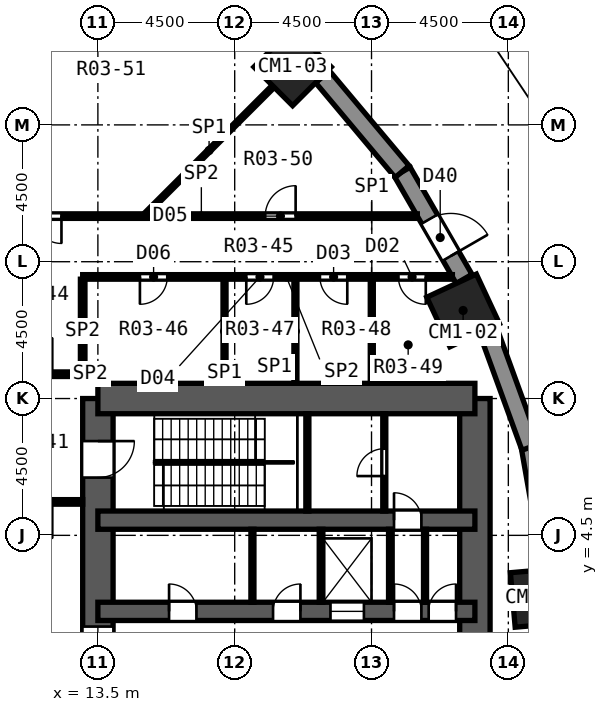
"""IFC4 building model, lengths in metres.
Left out: names, types, materials, properties, quantities, classifications, styles, units other than length and angle.
Written with IfcOpenShell. Run it as: python <this file> out.ifc"""

import sys

from ifc_helpers import new_model, si_unit, direction, frame, frame_2d, origin, origin_2d, place, context, subcontext, project, spatial, rectangle, extrude, element, fill, save


model = new_model("IFC4")
c1 = context("Model", 3, precision=1e-05, world=origin(), true_north=direction((0.0, 1.0)))
c2 = subcontext(c1, "Body", "Model", "MODEL_VIEW")
j1 = project(units=[si_unit("LENGTHUNIT", "METRE"), si_unit("PLANEANGLEUNIT", "RADIAN")], contexts=[c1])
p1 = place(None, origin())
s1 = spatial("IfcSite", under=j1, at=p1, CompositionType="ELEMENT")
p2 = place(p1, origin())
s2 = spatial("IfcBuilding", under=s1, at=p2, CompositionType="ELEMENT")
p3 = place(p2, origin())
s3 = spatial("IfcBuildingStorey", under=s2, at=p3, CompositionType="ELEMENT", Elevation=0.0)
for number, where, z_axis, x_axis in (
    (1, (28.043, 2.453, 0.0), (0.0, 0.0, 1.0), (0.996, 0.087, 0.0)),
    (2, (25.512, 11.897, 0.0), (0.0, 0.0, 1.0), (0.906, 0.423, 0.0)),
    (3, (19.905, 19.905, 0.0), (0.0, 0.0, 1.0), (0.707, 0.707, 0.0)),
):
    element("IfcColumn", number, at=place(p3, frame(where, z_axis=z_axis, x_axis=x_axis)), inside=s3, PredefinedType="COLUMN", context=c2, shape_type="SweptSolid", body=[
        extrude(rectangle(XDim=1.8, YDim=1.8, at=origin_2d()), origin(), (0.0, 0.0, 1.0), 5.0),
    ])
p4 = place(p3, frame((13.5, -9.0, 0.0), z_axis=(0.0, 0.0, 1.0), x_axis=(0.0, 1.0, 0.0)))
e4 = element("IfcWall", 4, at=p4, inside=s3, PredefinedType="SHEAR", context=c2, shape_type="SweptSolid", body=[
    extrude(rectangle(XDim=18.0, YDim=1.0, at=frame_2d((9.0, 0.0))), origin(), (0.0, 0.0, 1.0), 5.0),
])
p5 = place(p4, frame((15.4, 0.0, 0.0)))
e5 = element("IfcOpeningElement", 5, at=p5, cuts=e4, PredefinedType="OPENING", context=c2, shape_type="SweptSolid", body=[
    extrude(rectangle(XDim=1.2, YDim=2.1, at=frame_2d((0.6, 1.05))), frame((0.0, 0.512, 0.0), z_axis=(0.0, -1.0, 0.0), x_axis=(1.0, 0.0, 0.0)), (0.0, 0.0, 1.0), 1.024),
])
p6 = place(p4, frame((1.4, 0.0, 0.0)))
e6 = element("IfcOpeningElement", 6, at=p6, cuts=e4, PredefinedType="OPENING", context=c2, shape_type="SweptSolid", body=[
    extrude(rectangle(XDim=1.2, YDim=2.1, at=frame_2d((0.6, 1.05))), frame((0.0, 0.512, 0.0), z_axis=(0.0, -1.0, 0.0), x_axis=(1.0, 0.0, 0.0)), (0.0, 0.0, 1.0), 1.024),
])
p7 = place(p4, frame((7.5, 0.0, 0.0)))
e7 = element("IfcOpeningElement", 7, at=p7, cuts=e4, PredefinedType="OPENING", context=c2, shape_type="SweptSolid", body=[
    extrude(rectangle(XDim=3.0, YDim=2.4, at=frame_2d((1.5, 1.2))), frame((0.0, 0.512, 0.0), z_axis=(0.0, -1.0, 0.0), x_axis=(1.0, 0.0, 0.0)), (0.0, 0.0, 1.0), 1.024),
])
p8 = place(p3, frame((25.9, -9.0, 0.0), z_axis=(0.0, 0.0, 1.0), x_axis=(0.0, 1.0, 0.0)))
e8 = element("IfcWall", 8, at=p8, inside=s3, PredefinedType="SHEAR", context=c2, shape_type="SweptSolid", body=[
    extrude(rectangle(XDim=18.0, YDim=1.0, at=frame_2d((9.0, 0.0))), origin(), (0.0, 0.0, 1.0), 5.0),
])
p9 = place(p3, frame((13.5, 9.0, 0.0), z_axis=(0.0, 0.0, 1.0), x_axis=(1.0, 0.0, 0.0)))
e9 = element("IfcWall", 9, at=p9, inside=s3, PredefinedType="SHEAR", context=c2, shape_type="SweptSolid", body=[
    extrude(rectangle(XDim=12.4, YDim=1.0, at=frame_2d((6.2, 0.0))), origin(), (0.0, 0.0, 1.0), 5.0),
])
p10 = place(p3, frame((13.5, 5.0, 0.0), z_axis=(0.0, 0.0, 1.0), x_axis=(1.0, 0.0, 0.0)))
e10 = element("IfcWall", 10, at=p10, inside=s3, PredefinedType="SHEAR", context=c2, shape_type="SweptSolid", body=[
    extrude(rectangle(XDim=12.4, YDim=0.6, at=frame_2d((6.2, 0.0))), origin(), (0.0, 0.0, 1.0), 5.0),
])
p11 = place(p10, frame((9.74, 0.0, 0.0)))
e11 = element("IfcOpeningElement", 11, at=p11, cuts=e10, PredefinedType="OPENING", context=c2, shape_type="SweptSolid", body=[
    extrude(rectangle(XDim=0.9, YDim=2.1, at=frame_2d((0.45, 1.05))), frame((0.0, 0.312, 0.0), z_axis=(0.0, -1.0, 0.0), x_axis=(1.0, 0.0, 0.0)), (0.0, 0.0, 1.0), 0.624),
])
p12 = place(p3, frame((13.5, 2.0, 0.0), z_axis=(0.0, 0.0, 1.0), x_axis=(1.0, 0.0, 0.0)))
e12 = element("IfcWall", 12, at=p12, inside=s3, PredefinedType="SHEAR", context=c2, shape_type="SweptSolid", body=[
    extrude(rectangle(XDim=12.4, YDim=0.6, at=frame_2d((6.2, 0.0))), origin(), (0.0, 0.0, 1.0), 5.0),
])
p13 = place(p12, frame((7.65, 0.0, 0.0)))
e13 = element("IfcOpeningElement", 13, at=p13, cuts=e12, PredefinedType="OPENING", context=c2, shape_type="SweptSolid", body=[
    extrude(rectangle(XDim=1.1, YDim=2.1, at=frame_2d((0.55, 1.05))), frame((0.0, 0.312, 0.0), z_axis=(0.0, -1.0, 0.0), x_axis=(1.0, 0.0, 0.0)), (0.0, 0.0, 1.0), 0.624),
])
p14 = place(p12, frame((2.341, 0.0, 0.0)))
e14 = element("IfcOpeningElement", 14, at=p14, cuts=e12, PredefinedType="OPENING", context=c2, shape_type="SweptSolid", body=[
    extrude(rectangle(XDim=0.9, YDim=2.1, at=frame_2d((0.45, 1.05))), frame((0.0, 0.312, 0.0), z_axis=(0.0, -1.0, 0.0), x_axis=(1.0, 0.0, 0.0)), (0.0, 0.0, 1.0), 0.624),
])
p15 = place(p12, frame((5.761, 0.0, 0.0)))
e15 = element("IfcOpeningElement", 15, at=p15, cuts=e12, PredefinedType="OPENING", context=c2, shape_type="SweptSolid", body=[
    extrude(rectangle(XDim=0.9, YDim=2.1, at=frame_2d((0.45, 1.05))), frame((0.0, 0.312, 0.0), z_axis=(0.0, -1.0, 0.0), x_axis=(1.0, 0.0, 0.0)), (0.0, 0.0, 1.0), 0.624),
])
p16 = place(p12, frame((9.74, 0.0, 0.0)))
e16 = element("IfcOpeningElement", 16, at=p16, cuts=e12, PredefinedType="OPENING", context=c2, shape_type="SweptSolid", body=[
    extrude(rectangle(XDim=0.9, YDim=2.1, at=frame_2d((0.45, 1.05))), frame((0.0, 0.312, 0.0), z_axis=(0.0, -1.0, 0.0), x_axis=(1.0, 0.0, 0.0)), (0.0, 0.0, 1.0), 0.624),
])
p17 = place(p12, frame((10.88, 0.0, 0.0)))
e17 = element("IfcOpeningElement", 17, at=p17, cuts=e12, PredefinedType="OPENING", context=c2, shape_type="SweptSolid", body=[
    extrude(rectangle(XDim=0.9, YDim=2.1, at=frame_2d((0.45, 1.05))), frame((0.0, 0.312, 0.0), z_axis=(0.0, -1.0, 0.0), x_axis=(1.0, 0.0, 0.0)), (0.0, 0.0, 1.0), 0.624),
])
p18 = place(p3, frame((28.428, 3.417, 0.0), z_axis=(0.0, 0.0, 1.0), x_axis=(-0.173673210505, 0.984803338719, 0.0)))
e18 = element("IfcWall", 18, at=p18, inside=s3, PredefinedType="SOLIDWALL", context=c2, shape_type="SweptSolid", body=[
    extrude(rectangle(XDim=4.099, YDim=0.6, at=frame_2d((2.05, 0.0))), origin(), (0.0, 0.0, 1.0), 4.45),
])
p19 = place(p3, frame((27.73, 7.403, 0.0), z_axis=(0.0, 0.0, 1.0), x_axis=(-0.342034744565, 0.939687306241, 0.0)))
e19 = element("IfcWall", 19, at=p19, inside=s3, PredefinedType="SOLIDWALL", context=c2, shape_type="SweptSolid", body=[
    extrude(rectangle(XDim=4.099, YDim=0.6, at=frame_2d((2.05, 0.0))), origin(), (0.0, 0.0, 1.0), 4.45),
])
p20 = place(p3, frame((25.545, 12.934, 0.0), z_axis=(0.0, 0.0, 1.0), x_axis=(-0.500023678693, 0.866011732453, 0.0)))
e20 = element("IfcWall", 20, at=p20, inside=s3, PredefinedType="SOLIDWALL", context=c2, shape_type="SweptSolid", body=[
    extrude(rectangle(XDim=4.069, YDim=0.6, at=frame_2d((2.035, 0.0))), origin(), (0.0, 0.0, 1.0), 4.45),
])
p21 = place(p20, frame((0.872, 0.0, 0.0)))
e21 = element("IfcOpeningElement", 21, at=p21, cuts=e20, PredefinedType="OPENING", context=c2, shape_type="SweptSolid", body=[
    extrude(rectangle(XDim=1.4, YDim=2.1, at=frame_2d((0.7, 1.05))), frame((0.0, 0.312, 0.0), z_axis=(0.0, -1.0, 0.0), x_axis=(1.0, 0.0, 0.0)), (0.0, 0.0, 1.0), 0.624),
])
p22 = place(p3, frame((23.506, 16.464, 0.0), z_axis=(0.0, 0.0, 1.0), x_axis=(-0.642800844336, 0.766033337734, 0.0)))
e22 = element("IfcWall", 22, at=p22, inside=s3, PredefinedType="SOLIDWALL", context=c2, shape_type="SweptSolid", body=[
    extrude(rectangle(XDim=4.069, YDim=0.6, at=frame_2d((2.035, 0.0))), origin(), (0.0, 0.0, 1.0), 4.45),
])
p23 = place(p3, frame((9.8, 5.6, 0.0), z_axis=(0.0, 0.0, 1.0), x_axis=(1.0, 0.0, 0.0)))
e23 = element("IfcWall", 23, at=p23, inside=s3, PredefinedType="PARTITIONING", context=c2, shape_type="SweptSolid", body=[
    extrude(rectangle(XDim=3.2, YDim=0.15, at=frame_2d((1.6, 0.0))), origin(), (0.0, 0.0, 1.0), 4.45),
])
p24 = place(p23, frame((1.0, 0.0, 0.0)))
e24 = element("IfcOpeningElement", 24, at=p24, cuts=e23, PredefinedType="OPENING", context=c2, shape_type="SweptSolid", body=[
    extrude(rectangle(XDim=1.2, YDim=2.1, at=frame_2d((0.6, 1.05))), frame((0.0, 0.087, 0.0), z_axis=(0.0, -1.0, 0.0), x_axis=(1.0, 0.0, 0.0)), (0.0, 0.0, 1.0), 0.174),
])
p25 = place(p3, frame((9.8, 9.8, 0.0), z_axis=(0.0, 0.0, 1.0), x_axis=(1.0, 0.0, 0.0)))
e25 = element("IfcWall", 25, at=p25, inside=s3, PredefinedType="PARTITIONING", context=c2, shape_type="SweptSolid", body=[
    extrude(rectangle(XDim=3.125, YDim=0.15, at=frame_2d((1.562, 0.0))), origin(), (0.0, 0.0, 1.0), 4.45),
])
p26 = place(p25, frame((1.0, 0.0, 0.0)))
e26 = element("IfcOpeningElement", 26, at=p26, cuts=e25, PredefinedType="OPENING", context=c2, shape_type="SweptSolid", body=[
    extrude(rectangle(XDim=1.2, YDim=2.1, at=frame_2d((0.6, 1.05))), frame((0.0, 0.087, 0.0), z_axis=(0.0, -1.0, 0.0), x_axis=(1.0, 0.0, 0.0)), (0.0, 0.0, 1.0), 0.174),
])
p27 = place(p3, frame((13.0, 13.0, 0.0), z_axis=(0.0, 0.0, 1.0), x_axis=(1.0, 0.0, 0.0)))
e27 = element("IfcWall", 27, at=p27, inside=s3, PredefinedType="PARTITIONING", context=c2, shape_type="SweptSolid", body=[
    extrude(rectangle(XDim=12.16, YDim=0.15, at=frame_2d((6.08, 0.0))), origin(), (0.0, 0.0, 1.0), 4.45),
])
p28 = place(p27, frame((10.385, 0.0, 0.0)))
e28 = element("IfcOpeningElement", 28, at=p28, cuts=e27, PredefinedType="OPENING", context=c2, shape_type="SweptSolid", body=[
    extrude(rectangle(XDim=0.9, YDim=2.1, at=frame_2d((0.45, 1.05))), frame((0.0, 0.087, 0.0), z_axis=(0.0, -1.0, 0.0), x_axis=(1.0, 0.0, 0.0)), (0.0, 0.0, 1.0), 0.174),
])
p29 = place(p27, frame((7.803, 0.0, 0.0)))
e29 = element("IfcOpeningElement", 29, at=p29, cuts=e27, PredefinedType="OPENING", context=c2, shape_type="SweptSolid", body=[
    extrude(rectangle(XDim=0.9, YDim=2.1, at=frame_2d((0.45, 1.05))), frame((0.0, 0.087, 0.0), z_axis=(0.0, -1.0, 0.0), x_axis=(1.0, 0.0, 0.0)), (0.0, 0.0, 1.0), 0.174),
])
p30 = place(p27, frame((5.381, 0.0, 0.0)))
e30 = element("IfcOpeningElement", 30, at=p30, cuts=e27, PredefinedType="OPENING", context=c2, shape_type="SweptSolid", body=[
    extrude(rectangle(XDim=0.9, YDim=2.1, at=frame_2d((0.45, 1.05))), frame((0.0, 0.087, 0.0), z_axis=(0.0, -1.0, 0.0), x_axis=(1.0, 0.0, 0.0)), (0.0, 0.0, 1.0), 0.174),
])
p31 = place(p27, frame((1.883, 0.0, 0.0)))
e31 = element("IfcOpeningElement", 31, at=p31, cuts=e27, PredefinedType="OPENING", context=c2, shape_type="SweptSolid", body=[
    extrude(rectangle(XDim=0.9, YDim=2.1, at=frame_2d((0.45, 1.05))), frame((0.0, 0.087, 0.0), z_axis=(0.0, -1.0, 0.0), x_axis=(1.0, 0.0, 0.0)), (0.0, 0.0, 1.0), 0.174),
])
p32 = place(p3, frame((9.8, 15.0, 0.0), z_axis=(0.0, 0.0, 1.0), x_axis=(1.0, 0.0, 0.0)))
e32 = element("IfcWall", 32, at=p32, inside=s3, PredefinedType="PARTITIONING", context=c2, shape_type="SweptSolid", body=[
    extrude(rectangle(XDim=14.206, YDim=0.15, at=frame_2d((7.103, 0.0))), origin(), (0.0, 0.0, 1.0), 4.45),
])
p33 = place(p32, frame((9.204, 0.0, 0.0)))
e33 = element("IfcOpeningElement", 33, at=p33, cuts=e32, PredefinedType="OPENING", context=c2, shape_type="SweptSolid", body=[
    extrude(rectangle(XDim=1.0, YDim=2.1, at=frame_2d((0.5, 1.05))), frame((0.0, 0.087, 0.0), z_axis=(0.0, -1.0, 0.0), x_axis=(1.0, 0.0, 0.0)), (0.0, 0.0, 1.0), 0.174),
])
p34 = place(p32, frame((0.702, 0.0, 0.0)))
e34 = element("IfcOpeningElement", 34, at=p34, cuts=e32, PredefinedType="OPENING", context=c2, shape_type="SweptSolid", body=[
    extrude(rectangle(XDim=1.8, YDim=2.1, at=frame_2d((0.9, 1.05))), frame((0.0, 0.087, 0.0), z_axis=(0.0, -1.0, 0.0), x_axis=(1.0, 0.0, 0.0)), (0.0, 0.0, 1.0), 0.174),
])
p35 = place(p3, frame((15.053, 15.053, 0.0), z_axis=(0.0, 0.0, 1.0), x_axis=(0.707106781187, 0.707106781187, 0.0)))
e35 = element("IfcWall", 35, at=p35, inside=s3, PredefinedType="PARTITIONING", context=c2, shape_type="SweptSolid", body=[
    extrude(rectangle(XDim=5.952, YDim=0.1, at=frame_2d((2.976, 0.0))), origin(), (0.0, 0.0, 1.0), 4.45),
])
for number, where, z_axis, x_axis in (
    (36, (22.509, 9.5, 0.0), (0.0, 0.0, 1.0), (0.0, 1.0, 0.0)),
    (37, (19.997, 9.5, 0.0), (0.0, 0.0, 1.0), (0.0, 1.0, 0.0)),
    (38, (17.665, 9.5, 0.0), (0.0, 0.0, 1.0), (0.0, 1.0, 0.0)),
):
    element("IfcWall", number, at=place(p3, frame(where, z_axis=z_axis, x_axis=x_axis)), inside=s3, PredefinedType="PARTITIONING", context=c2, shape_type="SweptSolid", body=[
        extrude(rectangle(XDim=3.425, YDim=0.1, at=frame_2d((1.712, 0.0))), origin(), (0.0, 0.0, 1.0), 4.45),
    ])
p36 = place(p3, frame((13.0, 9.5, 0.0), z_axis=(0.0, 0.0, 1.0), x_axis=(0.0, 1.0, 0.0)))
e39 = element("IfcWall", 39, at=p36, inside=s3, PredefinedType="PARTITIONING", context=c2, shape_type="SweptSolid", body=[
    extrude(rectangle(XDim=3.425, YDim=0.15, at=frame_2d((1.712, 0.0))), origin(), (0.0, 0.0, 1.0), 4.45),
])
p37 = place(p3, frame((18.583, 2.3, 0.0), z_axis=(0.0, 0.0, 1.0), x_axis=(0.0, 1.0, 0.0)))
e40 = element("IfcWall", 40, at=p37, inside=s3, PredefinedType="PARTITIONING", context=c2, shape_type="SweptSolid", body=[
    extrude(rectangle(XDim=2.4, YDim=0.1, at=frame_2d((1.2, 0.0))), origin(), (0.0, 0.0, 1.0), 4.45),
])
for number, where, z_axis, x_axis in (
    (41, (20.84, 2.3, 0.0), (0.0, 0.0, 1.0), (0.0, 1.0, 0.0)),
    (42, (23.12, 2.3, 0.0), (0.0, 0.0, 1.0), (0.0, 1.0, 0.0)),
):
    element("IfcWall", number, at=place(p3, frame(where, z_axis=z_axis, x_axis=x_axis)), inside=s3, PredefinedType="PARTITIONING", context=c2, shape_type="SweptSolid", body=[
        extrude(rectangle(XDim=2.4, YDim=0.12, at=frame_2d((1.2, 0.0))), origin(), (0.0, 0.0, 1.0), 4.45),
    ])
p38 = place(p3, frame((24.26, 2.3, 0.0), z_axis=(0.0, 0.0, 1.0), x_axis=(0.0, 1.0, 0.0)))
e43 = element("IfcWall", 43, at=p38, inside=s3, PredefinedType="PARTITIONING", context=c2, shape_type="SweptSolid", body=[
    extrude(rectangle(XDim=2.4, YDim=0.1, at=frame_2d((1.2, 0.0))), origin(), (0.0, 0.0, 1.0), 4.45),
])
p39 = place(p3, frame((20.39, 5.3, 0.0), z_axis=(0.0, 0.0, 1.0), x_axis=(0.0, 1.0, 0.0)))
e44 = element("IfcWall", 44, at=p39, inside=s3, PredefinedType="PARTITIONING", context=c2, shape_type="SweptSolid", body=[
    extrude(rectangle(XDim=3.2, YDim=0.1, at=frame_2d((1.6, 0.0))), origin(), (0.0, 0.0, 1.0), 4.45),
])
p40 = place(p3, frame((22.92, 5.3, 0.0), z_axis=(0.0, 0.0, 1.0), x_axis=(0.0, 1.0, 0.0)))
e45 = element("IfcWall", 45, at=p40, inside=s3, PredefinedType="PARTITIONING", context=c2, shape_type="SweptSolid", body=[
    extrude(rectangle(XDim=3.2, YDim=0.1, at=frame_2d((1.6, 0.0))), origin(), (0.0, 0.0, 1.0), 4.45),
])
p41 = place(p40, frame((1.15, 0.0, 0.0)))
e46 = element("IfcOpeningElement", 46, at=p41, cuts=e45, PredefinedType="OPENING", context=c2, shape_type="SweptSolid", body=[
    extrude(rectangle(XDim=0.9, YDim=2.1, at=frame_2d((0.45, 1.05))), frame((0.0, 0.062, 0.0), z_axis=(0.0, -1.0, 0.0), x_axis=(1.0, 0.0, 0.0)), (0.0, 0.0, 1.0), 0.124),
])
p42 = place(p28, frame((0.9, 0.0, 0.0), z_axis=(0.0, 0.0, 1.0), x_axis=(-1.0, 0.0, 0.0)))
e47 = element("IfcDoor", 47, at=p42, inside=s3, OperationType="SINGLE_SWING_LEFT", PredefinedType="DOOR", context=c2, shape_type="SweptSolid", body=[
    extrude(rectangle(XDim=0.9, YDim=2.1, at=frame_2d((0.45, 1.05))), frame((0.0, 0.025, 0.0), z_axis=(0.0, -1.0, 0.0), x_axis=(1.0, 0.0, 0.0)), (0.0, 0.0, 1.0), 0.05),
])
fill(e28, e47)
p43 = place(p29, frame((0.9, 0.0, 0.0), z_axis=(0.0, 0.0, 1.0), x_axis=(-1.0, 0.0, 0.0)))
e48 = element("IfcDoor", 48, at=p43, inside=s3, OperationType="SINGLE_SWING_LEFT", PredefinedType="DOOR", context=c2, shape_type="SweptSolid", body=[
    extrude(rectangle(XDim=0.9, YDim=2.1, at=frame_2d((0.45, 1.05))), frame((0.0, 0.025, 0.0), z_axis=(0.0, -1.0, 0.0), x_axis=(1.0, 0.0, 0.0)), (0.0, 0.0, 1.0), 0.05),
])
fill(e29, e48)
p44 = place(p30, frame((0.9, 0.0, 0.0), z_axis=(0.0, 0.0, 1.0), x_axis=(-1.0, 0.0, 0.0)))
e49 = element("IfcDoor", 49, at=p44, inside=s3, OperationType="SINGLE_SWING_RIGHT", PredefinedType="DOOR", context=c2, shape_type="SweptSolid", body=[
    extrude(rectangle(XDim=0.9, YDim=2.1, at=frame_2d((0.45, 1.05))), frame((0.0, 0.025, 0.0), z_axis=(0.0, -1.0, 0.0), x_axis=(1.0, 0.0, 0.0)), (0.0, 0.0, 1.0), 0.05),
])
fill(e30, e49)
p45 = place(p33, origin())
e50 = element("IfcDoor", 50, at=p45, inside=s3, OperationType="SINGLE_SWING_RIGHT", PredefinedType="DOOR", context=c2, shape_type="SweptSolid", body=[
    extrude(rectangle(XDim=1.0, YDim=2.1, at=frame_2d((0.5, 1.05))), frame((0.0, 0.025, 0.0), z_axis=(0.0, -1.0, 0.0), x_axis=(1.0, 0.0, 0.0)), (0.0, 0.0, 1.0), 0.05),
])
fill(e33, e50)
p46 = place(p31, frame((0.9, 0.0, 0.0), z_axis=(0.0, 0.0, 1.0), x_axis=(-1.0, 0.0, 0.0)))
e51 = element("IfcDoor", 51, at=p46, inside=s3, OperationType="SINGLE_SWING_RIGHT", PredefinedType="DOOR", context=c2, shape_type="SweptSolid", body=[
    extrude(rectangle(XDim=0.9, YDim=2.1, at=frame_2d((0.45, 1.05))), frame((0.0, 0.025, 0.0), z_axis=(0.0, -1.0, 0.0), x_axis=(1.0, 0.0, 0.0)), (0.0, 0.0, 1.0), 0.05),
])
fill(e31, e51)
p47 = place(p26, origin())
e52 = element("IfcDoor", 52, at=p47, inside=s3, OperationType="SINGLE_SWING_RIGHT", PredefinedType="DOOR", context=c2, shape_type="SweptSolid", body=[
    extrude(rectangle(XDim=1.2, YDim=2.1, at=frame_2d((0.6, 1.05))), frame((0.0, 0.025, 0.0), z_axis=(0.0, -1.0, 0.0), x_axis=(1.0, 0.0, 0.0)), (0.0, 0.0, 1.0), 0.05),
])
fill(e26, e52)
p48 = place(p34, frame((1.8, 0.0, 0.0), z_axis=(0.0, 0.0, 1.0), x_axis=(-1.0, 0.0, 0.0)))
e53 = element("IfcDoor", 53, at=p48, inside=s3, OperationType="DOUBLE_DOOR_SINGLE_SWING", PredefinedType="DOOR", context=c2, shape_type="SweptSolid", body=[
    extrude(rectangle(XDim=1.8, YDim=2.1, at=frame_2d((0.9, 1.05))), frame((0.0, 0.025, 0.0), z_axis=(0.0, -1.0, 0.0), x_axis=(1.0, 0.0, 0.0)), (0.0, 0.0, 1.0), 0.05),
])
fill(e34, e53)
p49 = place(p21, frame((1.4, 0.0, 0.0), z_axis=(0.0, 0.0, 1.0), x_axis=(-1.0, 0.0, 0.0)))
e54 = element("IfcDoor", 54, at=p49, inside=s3, OperationType="SINGLE_SWING_RIGHT", PredefinedType="DOOR", context=c2, shape_type="SweptSolid", body=[
    extrude(rectangle(XDim=1.4, YDim=2.1, at=frame_2d((0.7, 1.05))), frame((0.0, 0.025, 0.0), z_axis=(0.0, -1.0, 0.0), x_axis=(1.0, 0.0, 0.0)), (0.0, 0.0, 1.0), 0.05),
])
fill(e21, e54)
p50 = place(p13, origin())
e55 = element("IfcDoor", 55, at=p50, inside=s3, OperationType="DOUBLE_DOOR_SLIDING", PredefinedType="DOOR", context=c2, shape_type="SweptSolid", body=[
    extrude(rectangle(XDim=1.1, YDim=2.1, at=frame_2d((0.55, 1.05))), frame((0.0, 0.025, 0.0), z_axis=(0.0, -1.0, 0.0), x_axis=(1.0, 0.0, 0.0)), (0.0, 0.0, 1.0), 0.05),
])
fill(e13, e55)
p51 = place(p14, origin())
e56 = element("IfcDoor", 56, at=p51, inside=s3, OperationType="SINGLE_SWING_LEFT", PredefinedType="DOOR", context=c2, shape_type="SweptSolid", body=[
    extrude(rectangle(XDim=0.9, YDim=2.1, at=frame_2d((0.45, 1.05))), frame((0.0, 0.025, 0.0), z_axis=(0.0, -1.0, 0.0), x_axis=(1.0, 0.0, 0.0)), (0.0, 0.0, 1.0), 0.05),
])
fill(e14, e56)
p52 = place(p15, origin())
e57 = element("IfcDoor", 57, at=p52, inside=s3, OperationType="SINGLE_SWING_RIGHT", PredefinedType="DOOR", context=c2, shape_type="SweptSolid", body=[
    extrude(rectangle(XDim=0.9, YDim=2.1, at=frame_2d((0.45, 1.05))), frame((0.0, 0.025, 0.0), z_axis=(0.0, -1.0, 0.0), x_axis=(1.0, 0.0, 0.0)), (0.0, 0.0, 1.0), 0.05),
])
fill(e15, e57)
p53 = place(p16, origin())
e58 = element("IfcDoor", 58, at=p53, inside=s3, OperationType="SINGLE_SWING_LEFT", PredefinedType="DOOR", context=c2, shape_type="SweptSolid", body=[
    extrude(rectangle(XDim=0.9, YDim=2.1, at=frame_2d((0.45, 1.05))), frame((0.0, 0.025, 0.0), z_axis=(0.0, -1.0, 0.0), x_axis=(1.0, 0.0, 0.0)), (0.0, 0.0, 1.0), 0.05),
])
fill(e16, e58)
p54 = place(p17, origin())
e59 = element("IfcDoor", 59, at=p54, inside=s3, OperationType="SINGLE_SWING_RIGHT", PredefinedType="DOOR", context=c2, shape_type="SweptSolid", body=[
    extrude(rectangle(XDim=0.9, YDim=2.1, at=frame_2d((0.45, 1.05))), frame((0.0, 0.025, 0.0), z_axis=(0.0, -1.0, 0.0), x_axis=(1.0, 0.0, 0.0)), (0.0, 0.0, 1.0), 0.05),
])
fill(e17, e59)
p55 = place(p41, origin())
e60 = element("IfcDoor", 60, at=p55, inside=s3, OperationType="SINGLE_SWING_LEFT", PredefinedType="DOOR", context=c2, shape_type="SweptSolid", body=[
    extrude(rectangle(XDim=0.9, YDim=2.1, at=frame_2d((0.45, 1.05))), frame((0.0, 0.025, 0.0), z_axis=(0.0, -1.0, 0.0), x_axis=(1.0, 0.0, 0.0)), (0.0, 0.0, 1.0), 0.05),
])
fill(e46, e60)
p56 = place(p11, origin())
e61 = element("IfcDoor", 61, at=p56, inside=s3, OperationType="SINGLE_SWING_LEFT", PredefinedType="DOOR", context=c2, shape_type="SweptSolid", body=[
    extrude(rectangle(XDim=0.9, YDim=2.1, at=frame_2d((0.45, 1.05))), frame((0.0, 0.025, 0.0), z_axis=(0.0, -1.0, 0.0), x_axis=(1.0, 0.0, 0.0)), (0.0, 0.0, 1.0), 0.05),
])
fill(e11, e61)
p57 = place(p5, frame((1.2, 0.0, 0.0), z_axis=(0.0, 0.0, 1.0), x_axis=(-1.0, 0.0, 0.0)))
e62 = element("IfcDoor", 62, at=p57, inside=s3, OperationType="SINGLE_SWING_LEFT", PredefinedType="DOOR", context=c2, shape_type="SweptSolid", body=[
    extrude(rectangle(XDim=1.2, YDim=2.1, at=frame_2d((0.6, 1.05))), frame((0.0, 0.025, 0.0), z_axis=(0.0, -1.0, 0.0), x_axis=(1.0, 0.0, 0.0)), (0.0, 0.0, 1.0), 0.05),
])
fill(e5, e62)
p58 = place(p7, origin())
e63 = element("IfcDoor", 63, at=p58, inside=s3, OperationType="DOUBLE_DOOR_SLIDING", PredefinedType="DOOR", context=c2, shape_type="SweptSolid", body=[
    extrude(rectangle(XDim=3.0, YDim=2.4, at=frame_2d((1.5, 1.2))), frame((0.0, 0.025, 0.0), z_axis=(0.0, -1.0, 0.0), x_axis=(1.0, 0.0, 0.0)), (0.0, 0.0, 1.0), 0.05),
])
fill(e7, e63)
save(model, sys.argv[1])
